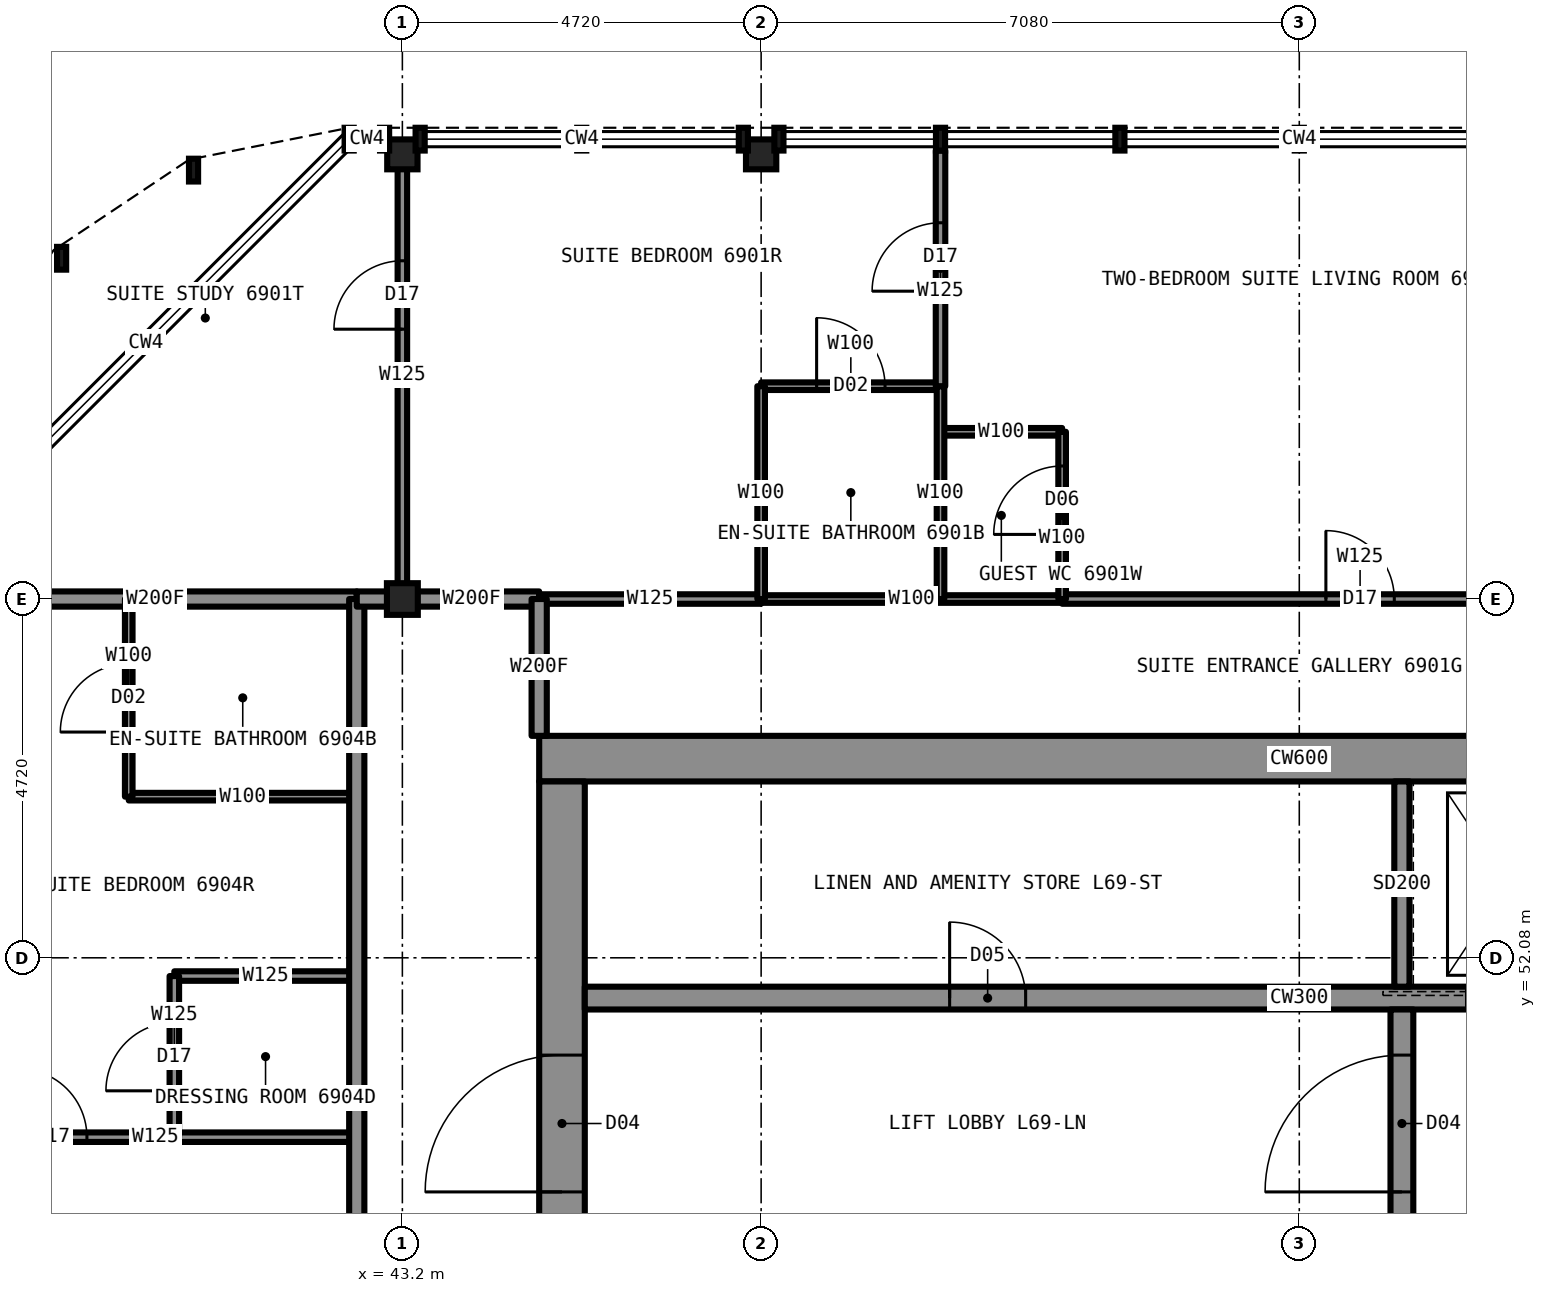
"""IFC4 building model, lengths in metres.
Left out: names, types, materials, properties, quantities, classifications, styles, units other than length and angle.
Written with IfcOpenShell. Run it as: python <this file> out.ifc"""

import sys

from ifc_helpers import new_model, si_unit, direction, frame, frame_2d, origin, origin_2d, place, context, subcontext, project, spatial, rectangle, i_section, extrude, element, fill, save


model = new_model("IFC4")
c1 = context("Model", 3, precision=1e-05, world=origin(), true_north=direction((0.0, 1.0)))
c2 = subcontext(c1, "Body", "Model", "MODEL_VIEW")
j1 = project(units=[si_unit("LENGTHUNIT", "METRE"), si_unit("PLANEANGLEUNIT", "RADIAN")], contexts=[c1])
p1 = place(None, origin())
s1 = spatial("IfcSite", under=j1, at=p1, CompositionType="ELEMENT")
p2 = place(p1, origin())
s2 = spatial("IfcBuilding", under=s1, at=p2, CompositionType="ELEMENT")
p3 = place(p2, frame((0.0, 0.0, 254.7)))
s3 = spatial("IfcBuildingStorey", under=s2, at=p3, CompositionType="ELEMENT", Elevation=254.7)
for number, where, z_axis, x_axis in (
    (1, (43.2, 62.65, 0.0), (0.0, 0.0, 1.0), (1.0, 0.0, 0.0)),
    (2, (47.92, 62.65, 0.0), (0.0, 0.0, 1.0), (1.0, 0.0, 0.0)),
):
    element("IfcColumn", number, at=place(p3, frame(where, z_axis=z_axis, x_axis=x_axis)), inside=s3, PredefinedType="COLUMN", context=c2, shape_type="SweptSolid", body=[
        extrude(i_section(OverallWidth=0.399, OverallDepth=0.394, WebThickness=0.023, FlangeThickness=0.037, at=origin_2d()), origin(), (0.0, 0.0, 1.0), 3.5),
    ])
p4 = place(p3, frame((43.2, 56.8, 0.0), z_axis=(0.0, 0.0, 1.0), x_axis=(1.0, 0.0, 0.0)))
e3 = element("IfcColumn", 3, at=p4, inside=s3, PredefinedType="COLUMN", context=c2, shape_type="SweptSolid", body=[
    extrude(i_section(OverallWidth=0.406, OverallDepth=0.417, WebThickness=0.03, FlangeThickness=0.048, at=origin_2d()), origin(), (0.0, 0.0, 1.0), 3.5),
])
p5 = place(p3, frame((45.0, 54.7, 0.0), z_axis=(0.0, 0.0, 1.0), x_axis=(1.0, 0.0, 0.0)))
e4 = element("IfcWall", 4, at=p5, inside=s3, PredefinedType="SHEAR", context=c2, shape_type="SweptSolid", body=[
    extrude(rectangle(XDim=20.0, YDim=0.6, at=frame_2d((10.0, 0.0))), origin(), (0.0, 0.0, 1.0), 3.5),
])
p6 = place(p3, frame((45.3, 35.6, 0.0), z_axis=(0.0, 0.0, 1.0), x_axis=(0.0, 1.0, 0.0)))
e5 = element("IfcWall", 5, at=p6, inside=s3, PredefinedType="SHEAR", context=c2, shape_type="SweptSolid", body=[
    extrude(rectangle(XDim=18.8, YDim=0.6, at=frame_2d((9.4, 0.0))), origin(), (0.0, 0.0, 1.0), 3.5),
])
p7 = place(p6, frame((13.4, 0.0, 0.0)))
e6 = element("IfcOpeningElement", 6, at=p7, cuts=e5, PredefinedType="OPENING", context=c2, shape_type="SweptSolid", body=[
    extrude(rectangle(XDim=1.8, YDim=2.2, at=frame_2d((0.9, 1.1))), frame((0.0, 0.31, 0.0), z_axis=(0.0, -1.0, 0.0), x_axis=(1.0, 0.0, 0.0)), (0.0, 0.0, 1.0), 0.62),
])
p8 = place(p6, frame((3.6, 0.0, 0.0)))
e7 = element("IfcOpeningElement", 7, at=p8, cuts=e5, PredefinedType="OPENING", context=c2, shape_type="SweptSolid", body=[
    extrude(rectangle(XDim=1.8, YDim=2.2, at=frame_2d((0.9, 1.1))), frame((0.0, 0.31, 0.0), z_axis=(0.0, -1.0, 0.0), x_axis=(1.0, 0.0, 0.0)), (0.0, 0.0, 1.0), 0.62),
])
p9 = place(p6, frame((6.4, 0.0, 0.0)))
e8 = element("IfcOpeningElement", 8, at=p9, cuts=e5, PredefinedType="OPENING", context=c2, shape_type="SweptSolid", body=[
    extrude(rectangle(XDim=1.2, YDim=2.2, at=frame_2d((0.6, 1.1))), frame((0.0, 0.31, 0.0), z_axis=(0.0, -1.0, 0.0), x_axis=(1.0, 0.0, 0.0)), (0.0, 0.0, 1.0), 0.62),
])
p10 = place(p3, frame((45.6, 51.55, 0.0), z_axis=(0.0, 0.0, 1.0), x_axis=(1.0, 0.0, 0.0)))
e9 = element("IfcWall", 9, at=p10, inside=s3, PredefinedType="SHEAR", context=c2, shape_type="SweptSolid", body=[
    extrude(rectangle(XDim=18.8, YDim=0.3, at=frame_2d((9.4, 0.0))), origin(), (0.0, 0.0, 1.0), 3.5),
])
p11 = place(p10, frame((4.8, 0.0, 0.0)))
e10 = element("IfcOpeningElement", 10, at=p11, cuts=e9, PredefinedType="OPENING", context=c2, shape_type="SweptSolid", body=[
    extrude(rectangle(XDim=1.0, YDim=2.1, at=frame_2d((0.5, 1.05))), frame((0.0, 0.16, 0.0), z_axis=(0.0, -1.0, 0.0), x_axis=(1.0, 0.0, 0.0)), (0.0, 0.0, 1.0), 0.32),
])
p12 = place(p10, frame((11.6, 0.0, 0.0)))
e11 = element("IfcOpeningElement", 11, at=p12, cuts=e9, PredefinedType="OPENING", context=c2, shape_type="SweptSolid", body=[
    extrude(rectangle(XDim=1.1, YDim=2.2, at=frame_2d((0.55, 1.1))), frame((0.0, 0.16, 0.0), z_axis=(0.0, -1.0, 0.0), x_axis=(1.0, 0.0, 0.0)), (0.0, 0.0, 1.0), 0.32),
])
p13 = place(p10, frame((14.3, 0.0, 0.0)))
e12 = element("IfcOpeningElement", 12, at=p13, cuts=e9, PredefinedType="OPENING", context=c2, shape_type="SweptSolid", body=[
    extrude(rectangle(XDim=1.1, YDim=2.2, at=frame_2d((0.55, 1.1))), frame((0.0, 0.16, 0.0), z_axis=(0.0, -1.0, 0.0), x_axis=(1.0, 0.0, 0.0)), (0.0, 0.0, 1.0), 0.32),
])
p14 = place(p3, frame((56.35, 41.9, 0.0), z_axis=(0.0, 0.0, 1.0), x_axis=(0.0, 1.0, 0.0)))
e13 = element("IfcWall", 13, at=p14, inside=s3, PredefinedType="SHEAR", context=c2, shape_type="SweptSolid", body=[
    extrude(rectangle(XDim=9.5, YDim=0.3, at=frame_2d((4.75, 0.0))), origin(), (0.0, 0.0, 1.0), 3.5),
])
p15 = place(p14, frame((7.1, 0.0, 0.0)))
e14 = element("IfcOpeningElement", 14, at=p15, cuts=e13, PredefinedType="OPENING", context=c2, shape_type="SweptSolid", body=[
    extrude(rectangle(XDim=1.8, YDim=2.2, at=frame_2d((0.9, 1.1))), frame((0.0, 0.16, 0.0), z_axis=(0.0, -1.0, 0.0), x_axis=(1.0, 0.0, 0.0)), (0.0, 0.0, 1.0), 0.32),
])
p16 = place(p3, frame((47.92, 56.8, 0.0), z_axis=(0.0, 0.0, 1.0), x_axis=(1.0, 0.0, 0.0)))
e15 = element("IfcWall", 15, at=p16, inside=s3, PredefinedType="PARTITIONING", context=c2, shape_type="SweptSolid", body=[
    extrude(rectangle(XDim=3.96, YDim=0.1, at=frame_2d((1.98, 0.0))), origin(), (0.0, 0.0, 1.0), 3.33),
])
p17 = place(p3, frame((43.22, 56.8, 0.0), z_axis=(0.0, 0.0, 1.0), x_axis=(1.0, 0.0, 0.0)))
e16 = element("IfcWall", 16, at=p17, inside=s3, PredefinedType="PARTITIONING", context=c2, shape_type="SweptSolid", body=[
    extrude(rectangle(XDim=1.78, YDim=0.2, at=frame_2d((0.89, 0.0))), origin(), (0.0, 0.0, 1.0), 3.33),
])
p18 = place(p3, frame((37.3, 56.8, 0.0), z_axis=(0.0, 0.0, 1.0), x_axis=(1.0, 0.0, 0.0)))
e17 = element("IfcWall", 17, at=p18, inside=s3, PredefinedType="PARTITIONING", context=c2, shape_type="SweptSolid", body=[
    extrude(rectangle(XDim=5.3, YDim=0.2, at=frame_2d((2.65, 0.0))), origin(), (0.0, 0.0, 1.0), 2.573),
])
p19 = place(p3, frame((45.0, 56.8, 0.0), z_axis=(0.0, 0.0, 1.0), x_axis=(1.0, 0.0, 0.0)))
e18 = element("IfcWall", 18, at=p19, inside=s3, PredefinedType="PARTITIONING", context=c2, shape_type="SweptSolid", body=[
    extrude(rectangle(XDim=2.92, YDim=0.125, at=frame_2d((1.46, 0.0))), origin(), (0.0, 0.0, 1.0), 3.33),
])
p20 = place(p3, frame((51.88, 56.8, 0.0), z_axis=(0.0, 0.0, 1.0), x_axis=(1.0, 0.0, 0.0)))
e19 = element("IfcWall", 19, at=p20, inside=s3, PredefinedType="PARTITIONING", context=c2, shape_type="SweptSolid", body=[
    extrude(rectangle(XDim=7.84, YDim=0.125, at=frame_2d((3.92, 0.0))), origin(), (0.0, 0.0, 1.0), 3.33),
])
p21 = place(p20, frame((3.47, 0.0, 0.0)))
e20 = element("IfcOpeningElement", 20, at=p21, cuts=e19, PredefinedType="OPENING", context=c2, shape_type="SweptSolid", body=[
    extrude(rectangle(XDim=0.9, YDim=2.2, at=frame_2d((0.45, 1.1))), frame((0.0, 0.073, 0.0), z_axis=(0.0, -1.0, 0.0), x_axis=(1.0, 0.0, 0.0)), (0.0, 0.0, 1.0), 0.145),
])
p22 = place(p3, frame((50.28, 59.0, 0.0), z_axis=(0.0, 0.0, 1.0), x_axis=(1.0, 0.0, 0.0)))
e21 = element("IfcWall", 21, at=p22, inside=s3, PredefinedType="PARTITIONING", context=c2, shape_type="SweptSolid", body=[
    extrude(rectangle(XDim=1.6, YDim=0.1, at=frame_2d((0.8, 0.0))), origin(), (0.0, 0.0, 1.0), 3.33),
])
p23 = place(p3, frame((47.92, 59.6, 0.0), z_axis=(0.0, 0.0, 1.0), x_axis=(1.0, 0.0, 0.0)))
e22 = element("IfcWall", 22, at=p23, inside=s3, PredefinedType="PARTITIONING", context=c2, shape_type="SweptSolid", body=[
    extrude(rectangle(XDim=2.36, YDim=0.1, at=frame_2d((1.18, 0.0))), origin(), (0.0, 0.0, 1.0), 3.33),
])
p24 = place(p23, frame((0.73, 0.0, 0.0)))
e23 = element("IfcOpeningElement", 23, at=p24, cuts=e22, PredefinedType="OPENING", context=c2, shape_type="SweptSolid", body=[
    extrude(rectangle(XDim=0.9, YDim=2.1, at=frame_2d((0.45, 1.05))), frame((0.0, 0.06, 0.0), z_axis=(0.0, -1.0, 0.0), x_axis=(1.0, 0.0, 0.0)), (0.0, 0.0, 1.0), 0.12),
])
p25 = place(p3, frame((37.3, 49.72, 0.0), z_axis=(0.0, 0.0, 1.0), x_axis=(1.0, 0.0, 0.0)))
e24 = element("IfcWall", 24, at=p25, inside=s3, PredefinedType="PARTITIONING", context=c2, shape_type="SweptSolid", body=[
    extrude(rectangle(XDim=5.3, YDim=0.125, at=frame_2d((2.65, 0.0))), origin(), (0.0, 0.0, 1.0), 2.797),
])
p26 = place(p25, frame((0.85, 0.0, 0.0)))
e25 = element("IfcOpeningElement", 25, at=p26, cuts=e24, PredefinedType="OPENING", context=c2, shape_type="SweptSolid", body=[
    extrude(rectangle(XDim=0.9, YDim=2.2, at=frame_2d((0.45, 1.1))), frame((0.0, 0.073, 0.0), z_axis=(0.0, -1.0, 0.0), x_axis=(1.0, 0.0, 0.0)), (0.0, 0.0, 1.0), 0.145),
])
p27 = place(p3, frame((40.2, 51.84, 0.0), z_axis=(0.0, 0.0, 1.0), x_axis=(1.0, 0.0, 0.0)))
e26 = element("IfcWall", 26, at=p27, inside=s3, PredefinedType="PARTITIONING", context=c2, shape_type="SweptSolid", body=[
    extrude(rectangle(XDim=2.4, YDim=0.125, at=frame_2d((1.2, 0.0))), origin(), (0.0, 0.0, 1.0), 3.33),
])
p28 = place(p3, frame((39.6, 54.2, 0.0), z_axis=(0.0, 0.0, 1.0), x_axis=(1.0, 0.0, 0.0)))
e27 = element("IfcWall", 27, at=p28, inside=s3, PredefinedType="PARTITIONING", context=c2, shape_type="SweptSolid", body=[
    extrude(rectangle(XDim=3.0, YDim=0.1, at=frame_2d((1.5, 0.0))), origin(), (0.0, 0.0, 1.0), 3.33),
])
p29 = place(p3, frame((45.0, 55.0, 0.0), z_axis=(0.0, 0.0, 1.0), x_axis=(0.0, 1.0, 0.0)))
e28 = element("IfcWall", 28, at=p29, inside=s3, PredefinedType="PARTITIONING", context=c2, shape_type="SweptSolid", body=[
    extrude(rectangle(XDim=1.8, YDim=0.2, at=frame_2d((0.9, 0.0))), origin(), (0.0, 0.0, 1.0), 3.33),
])
p30 = place(p3, frame((43.2, 56.8, 0.0), z_axis=(0.0, 0.0, 1.0), x_axis=(0.0, 1.0, 0.0)))
e29 = element("IfcWall", 29, at=p30, inside=s3, PredefinedType="PARTITIONING", context=c2, shape_type="SweptSolid", body=[
    extrude(rectangle(XDim=5.9, YDim=0.125, at=frame_2d((2.95, 0.0))), origin(), (0.0, 0.0, 1.0), 2.573),
])
p31 = place(p30, frame((3.55, 0.0, 0.0)))
e30 = element("IfcOpeningElement", 30, at=p31, cuts=e29, PredefinedType="OPENING", context=c2, shape_type="SweptSolid", body=[
    extrude(rectangle(XDim=0.9, YDim=2.2, at=frame_2d((0.45, 1.1))), frame((0.0, 0.073, 0.0), z_axis=(0.0, -1.0, 0.0), x_axis=(1.0, 0.0, 0.0)), (0.0, 0.0, 1.0), 0.145),
])
p32 = place(p3, frame((42.6, 33.2, 0.0), z_axis=(0.0, 0.0, 1.0), x_axis=(0.0, 1.0, 0.0)))
e31 = element("IfcWall", 31, at=p32, inside=s3, PredefinedType="PARTITIONING", context=c2, shape_type="SweptSolid", body=[
    extrude(rectangle(XDim=23.6, YDim=0.2, at=frame_2d((11.8, 0.0))), origin(), (0.0, 0.0, 1.0), 3.33),
])
p33 = place(p32, frame((8.95, 0.0, 0.0)))
e32 = element("IfcOpeningElement", 32, at=p33, cuts=e31, PredefinedType="OPENING", context=c2, shape_type="SweptSolid", body=[
    extrude(rectangle(XDim=1.1, YDim=2.2, at=frame_2d((0.55, 1.1))), frame((0.0, 0.11, 0.0), z_axis=(0.0, -1.0, 0.0), x_axis=(1.0, 0.0, 0.0)), (0.0, 0.0, 1.0), 0.22),
])
p34 = place(p3, frame((40.2, 49.72, 0.0), z_axis=(0.0, 0.0, 1.0), x_axis=(0.0, 1.0, 0.0)))
e33 = element("IfcWall", 33, at=p34, inside=s3, PredefinedType="PARTITIONING", context=c2, shape_type="SweptSolid", body=[
    extrude(rectangle(XDim=2.12, YDim=0.125, at=frame_2d((1.06, 0.0))), origin(), (0.0, 0.0, 1.0), 3.33),
])
p35 = place(p34, frame((0.61, 0.0, 0.0)))
e34 = element("IfcOpeningElement", 34, at=p35, cuts=e33, PredefinedType="OPENING", context=c2, shape_type="SweptSolid", body=[
    extrude(rectangle(XDim=0.9, YDim=2.2, at=frame_2d((0.45, 1.1))), frame((0.0, 0.073, 0.0), z_axis=(0.0, -1.0, 0.0), x_axis=(1.0, 0.0, 0.0)), (0.0, 0.0, 1.0), 0.145),
])
p36 = place(p3, frame((39.6, 54.2, 0.0), z_axis=(0.0, 0.0, 1.0), x_axis=(0.0, 1.0, 0.0)))
e35 = element("IfcWall", 35, at=p36, inside=s3, PredefinedType="PARTITIONING", context=c2, shape_type="SweptSolid", body=[
    extrude(rectangle(XDim=2.6, YDim=0.1, at=frame_2d((1.3, 0.0))), origin(), (0.0, 0.0, 1.0), 3.33),
])
p37 = place(p36, frame((0.85, 0.0, 0.0)))
e36 = element("IfcOpeningElement", 36, at=p37, cuts=e35, PredefinedType="OPENING", context=c2, shape_type="SweptSolid", body=[
    extrude(rectangle(XDim=0.9, YDim=2.1, at=frame_2d((0.45, 1.05))), frame((0.0, 0.06, 0.0), z_axis=(0.0, -1.0, 0.0), x_axis=(1.0, 0.0, 0.0)), (0.0, 0.0, 1.0), 0.12),
])
p38 = place(p3, frame((51.88, 56.8, 0.0), z_axis=(0.0, 0.0, 1.0), x_axis=(0.0, 1.0, 0.0)))
e37 = element("IfcWall", 37, at=p38, inside=s3, PredefinedType="PARTITIONING", context=c2, shape_type="SweptSolid", body=[
    extrude(rectangle(XDim=2.2, YDim=0.1, at=frame_2d((1.1, 0.0))), origin(), (0.0, 0.0, 1.0), 3.33),
])
p39 = place(p38, frame((0.85, 0.0, 0.0)))
e38 = element("IfcOpeningElement", 38, at=p39, cuts=e37, PredefinedType="OPENING", context=c2, shape_type="SweptSolid", body=[
    extrude(rectangle(XDim=0.9, YDim=2.1, at=frame_2d((0.45, 1.05))), frame((0.0, 0.06, 0.0), z_axis=(0.0, -1.0, 0.0), x_axis=(1.0, 0.0, 0.0)), (0.0, 0.0, 1.0), 0.12),
])
p40 = place(p3, frame((50.28, 56.8, 0.0), z_axis=(0.0, 0.0, 1.0), x_axis=(0.0, 1.0, 0.0)))
e39 = element("IfcWall", 39, at=p40, inside=s3, PredefinedType="PARTITIONING", context=c2, shape_type="SweptSolid", body=[
    extrude(rectangle(XDim=2.8, YDim=0.1, at=frame_2d((1.4, 0.0))), origin(), (0.0, 0.0, 1.0), 3.33),
])
p41 = place(p3, frame((50.28, 59.6, 0.0), z_axis=(0.0, 0.0, 1.0), x_axis=(0.0, 1.0, 0.0)))
e40 = element("IfcWall", 40, at=p41, inside=s3, PredefinedType="PARTITIONING", context=c2, shape_type="SweptSolid", body=[
    extrude(rectangle(XDim=3.1, YDim=0.125, at=frame_2d((1.55, 0.0))), origin(), (0.0, 0.0, 1.0), 3.33),
])
p42 = place(p41, frame((1.25, 0.0, 0.0)))
e41 = element("IfcOpeningElement", 41, at=p42, cuts=e40, PredefinedType="OPENING", context=c2, shape_type="SweptSolid", body=[
    extrude(rectangle(XDim=0.9, YDim=2.2, at=frame_2d((0.45, 1.1))), frame((0.0, 0.073, 0.0), z_axis=(0.0, -1.0, 0.0), x_axis=(1.0, 0.0, 0.0)), (0.0, 0.0, 1.0), 0.145),
])
p43 = place(p3, frame((47.92, 56.8, 0.0), z_axis=(0.0, 0.0, 1.0), x_axis=(0.0, 1.0, 0.0)))
e42 = element("IfcWall", 42, at=p43, inside=s3, PredefinedType="PARTITIONING", context=c2, shape_type="SweptSolid", body=[
    extrude(rectangle(XDim=2.8, YDim=0.1, at=frame_2d((1.4, 0.0))), origin(), (0.0, 0.0, 1.0), 2.573),
])
p44 = place(p3, frame((56.35, 51.7, 0.0), z_axis=(0.0, 0.0, 1.0), x_axis=(0.0, 1.0, 0.0)))
e43 = element("IfcWall", 43, at=p44, inside=s3, PredefinedType="PARTITIONING", context=c2, shape_type="SweptSolid", body=[
    extrude(rectangle(XDim=2.7, YDim=0.2, at=frame_2d((1.35, 0.0))), origin(), (0.0, 0.0, 1.0), 3.33),
])
p45 = place(p3, frame((42.6, 56.8, 0.0), z_axis=(0.0, 0.0, 1.0), x_axis=(1.0, 0.0, 0.0)))
e44 = element("IfcWall", 44, at=p45, inside=s3, PredefinedType="PARTITIONING", context=c2, shape_type="SweptSolid", body=[
    extrude(rectangle(XDim=0.62, YDim=0.2, at=frame_2d((0.31, 0.0))), origin(), (0.0, 0.0, 1.0), 2.573),
])
p46 = place(p21, origin())
e45 = element("IfcDoor", 45, at=p46, inside=s3, OperationType="SINGLE_SWING_LEFT", PredefinedType="DOOR", context=c2, shape_type="SweptSolid", body=[
    extrude(rectangle(XDim=0.9, YDim=2.2, at=frame_2d((0.45, 1.1))), frame((0.0, 0.025, 0.0), z_axis=(0.0, -1.0, 0.0), x_axis=(1.0, 0.0, 0.0)), (0.0, 0.0, 1.0), 0.05),
])
fill(e20, e45)
p47 = place(p24, origin())
e46 = element("IfcDoor", 46, at=p47, inside=s3, OperationType="SINGLE_SWING_RIGHT", PredefinedType="DOOR", context=c2, shape_type="SweptSolid", body=[
    extrude(rectangle(XDim=0.9, YDim=2.1, at=frame_2d((0.45, 1.05))), frame((0.0, 0.025, 0.0), z_axis=(0.0, -1.0, 0.0), x_axis=(1.0, 0.0, 0.0)), (0.0, 0.0, 1.0), 0.05),
])
fill(e23, e46)
p48 = place(p42, origin())
e47 = element("IfcDoor", 47, at=p48, inside=s3, OperationType="SINGLE_SWING_LEFT", PredefinedType="DOOR", context=c2, shape_type="SweptSolid", body=[
    extrude(rectangle(XDim=0.9, YDim=2.2, at=frame_2d((0.45, 1.1))), frame((0.0, 0.025, 0.0), z_axis=(0.0, -1.0, 0.0), x_axis=(1.0, 0.0, 0.0)), (0.0, 0.0, 1.0), 0.05),
])
fill(e41, e47)
p49 = place(p31, origin())
e48 = element("IfcDoor", 48, at=p49, inside=s3, OperationType="SINGLE_SWING_LEFT", PredefinedType="DOOR", context=c2, shape_type="SweptSolid", body=[
    extrude(rectangle(XDim=0.9, YDim=2.2, at=frame_2d((0.45, 1.1))), frame((0.0, 0.025, 0.0), z_axis=(0.0, -1.0, 0.0), x_axis=(1.0, 0.0, 0.0)), (0.0, 0.0, 1.0), 0.05),
])
fill(e30, e48)
p50 = place(p39, origin())
e49 = element("IfcDoor", 49, at=p50, inside=s3, OperationType="SINGLE_SWING_LEFT", PredefinedType="DOOR", context=c2, shape_type="SweptSolid", body=[
    extrude(rectangle(XDim=0.9, YDim=2.1, at=frame_2d((0.45, 1.05))), frame((0.0, 0.025, 0.0), z_axis=(0.0, -1.0, 0.0), x_axis=(1.0, 0.0, 0.0)), (0.0, 0.0, 1.0), 0.05),
])
fill(e38, e49)
p51 = place(p37, origin())
e50 = element("IfcDoor", 50, at=p51, inside=s3, OperationType="SINGLE_SWING_RIGHT", PredefinedType="DOOR", context=c2, shape_type="SweptSolid", body=[
    extrude(rectangle(XDim=0.9, YDim=2.1, at=frame_2d((0.45, 1.05))), frame((0.0, 0.025, 0.0), z_axis=(0.0, -1.0, 0.0), x_axis=(1.0, 0.0, 0.0)), (0.0, 0.0, 1.0), 0.05),
])
fill(e36, e50)
p52 = place(p35, origin())
e51 = element("IfcDoor", 51, at=p52, inside=s3, OperationType="SINGLE_SWING_LEFT", PredefinedType="DOOR", context=c2, shape_type="SweptSolid", body=[
    extrude(rectangle(XDim=0.9, YDim=2.2, at=frame_2d((0.45, 1.1))), frame((0.0, 0.025, 0.0), z_axis=(0.0, -1.0, 0.0), x_axis=(1.0, 0.0, 0.0)), (0.0, 0.0, 1.0), 0.05),
])
fill(e34, e51)
p53 = place(p26, origin())
e52 = element("IfcDoor", 52, at=p53, inside=s3, OperationType="SINGLE_SWING_LEFT", PredefinedType="DOOR", context=c2, shape_type="SweptSolid", body=[
    extrude(rectangle(XDim=0.9, YDim=2.2, at=frame_2d((0.45, 1.1))), frame((0.0, 0.025, 0.0), z_axis=(0.0, -1.0, 0.0), x_axis=(1.0, 0.0, 0.0)), (0.0, 0.0, 1.0), 0.05),
])
fill(e25, e52)
p54 = place(p7, origin())
e53 = element("IfcDoor", 53, at=p54, inside=s3, OperationType="DOUBLE_DOOR_SINGLE_SWING", PredefinedType="DOOR", context=c2, shape_type="SweptSolid", body=[
    extrude(rectangle(XDim=1.8, YDim=2.2, at=frame_2d((0.9, 1.1))), frame((0.0, 0.025, 0.0), z_axis=(0.0, -1.0, 0.0), x_axis=(1.0, 0.0, 0.0)), (0.0, 0.0, 1.0), 0.05),
])
fill(e6, e53)
p55 = place(p15, origin())
e54 = element("IfcDoor", 54, at=p55, inside=s3, OperationType="DOUBLE_DOOR_SINGLE_SWING", PredefinedType="DOOR", context=c2, shape_type="SweptSolid", body=[
    extrude(rectangle(XDim=1.8, YDim=2.2, at=frame_2d((0.9, 1.1))), frame((0.0, 0.025, 0.0), z_axis=(0.0, -1.0, 0.0), x_axis=(1.0, 0.0, 0.0)), (0.0, 0.0, 1.0), 0.05),
])
fill(e14, e54)
p56 = place(p11, origin())
e55 = element("IfcDoor", 55, at=p56, inside=s3, OperationType="SINGLE_SWING_LEFT", PredefinedType="DOOR", context=c2, shape_type="SweptSolid", body=[
    extrude(rectangle(XDim=1.0, YDim=2.1, at=frame_2d((0.5, 1.05))), frame((0.0, 0.025, 0.0), z_axis=(0.0, -1.0, 0.0), x_axis=(1.0, 0.0, 0.0)), (0.0, 0.0, 1.0), 0.05),
])
fill(e10, e55)
save(model, sys.argv[1])
